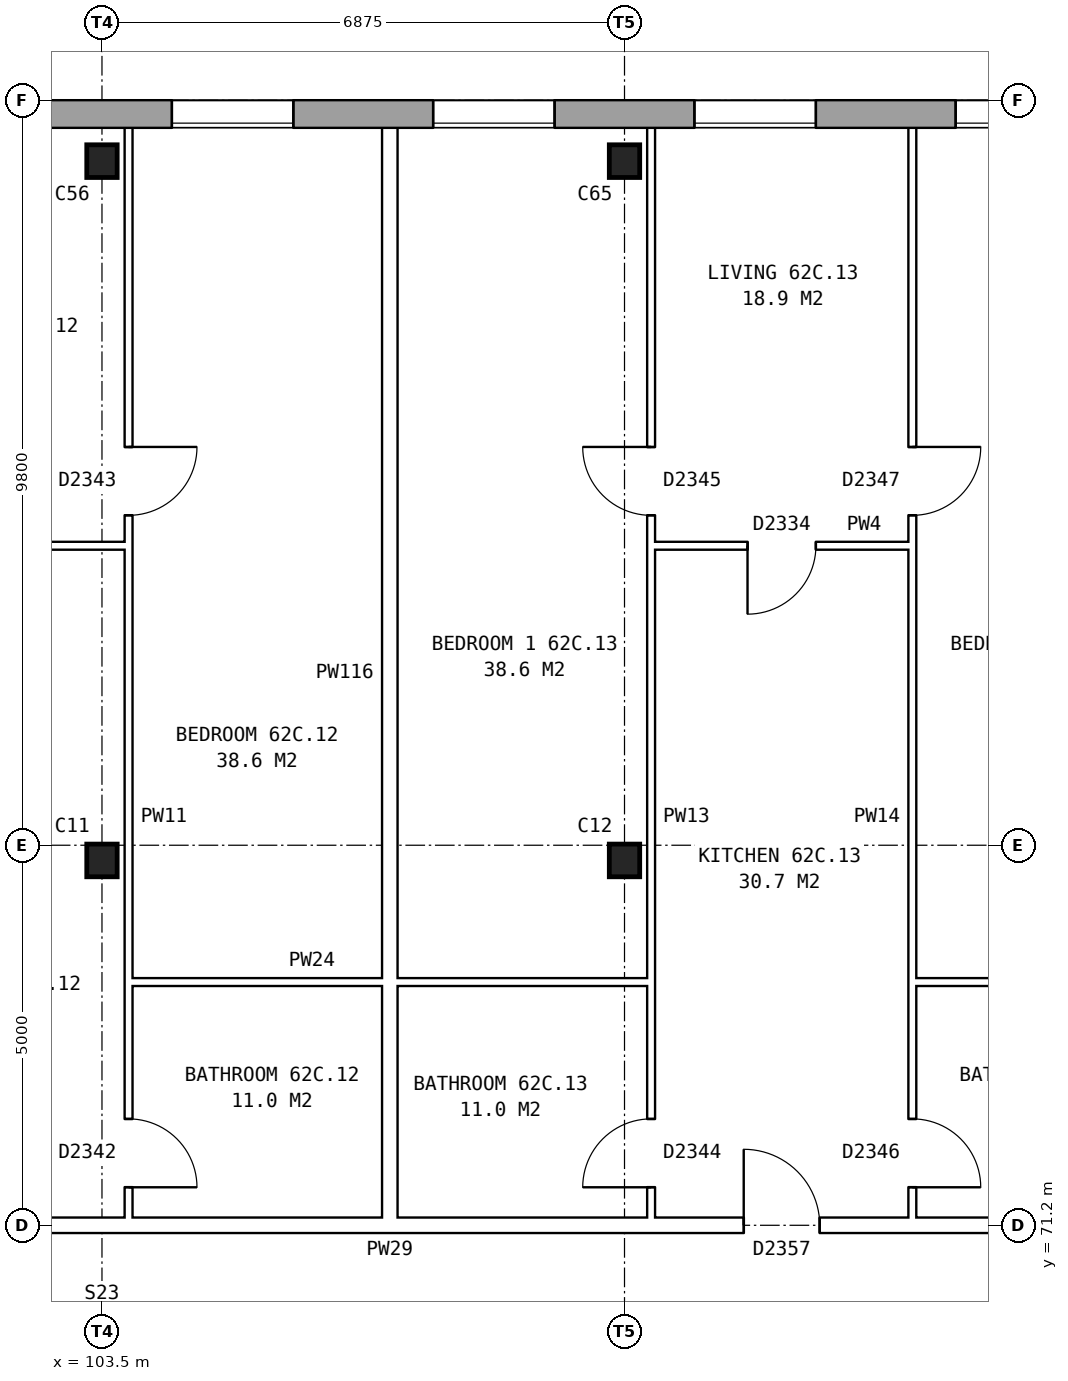
"""IFC4 building model, lengths in metres.
Left out: names, types, materials, properties, quantities, classifications, styles, units other than length and angle.
Written with IfcOpenShell. Run it as: python <this file> out.ifc"""

import sys

from ifc_helpers import new_model, si_unit, direction, frame, frame_2d, origin, origin_2d, place, context, subcontext, project, spatial, rectangle, i_section, extrude, element, fill, save


model = new_model("IFC4")
c1 = context("Model", 3, precision=1e-05, world=origin(), true_north=direction((0.0, 1.0)))
c2 = subcontext(c1, "Body", "Model", "MODEL_VIEW")
j1 = project(units=[si_unit("LENGTHUNIT", "METRE"), si_unit("PLANEANGLEUNIT", "RADIAN")], contexts=[c1])
p1 = place(None, origin())
s1 = spatial("IfcSite", under=j1, at=p1, CompositionType="ELEMENT")
p2 = place(p1, origin())
s2 = spatial("IfcBuilding", under=s1, at=p2, CompositionType="ELEMENT")
p3 = place(p2, frame((0.0, 0.0, 221.4)))
s3 = spatial("IfcBuildingStorey", under=s2, at=p3, CompositionType="ELEMENT", Elevation=221.4)
for number, where, z_axis, x_axis in (
    (1, (103.5, 76.0, 0.0), (0.0, 0.0, 1.0), (1.0, 0.0, 0.0)),
    (2, (110.375, 76.0, 0.0), (0.0, 0.0, 1.0), (1.0, 0.0, 0.0)),
    (3, (103.5, 85.2, 0.0), (0.0, 0.0, 1.0), (1.0, 0.0, 0.0)),
    (4, (110.375, 85.2, 0.0), (0.0, 0.0, 1.0), (1.0, 0.0, 0.0)),
):
    element("IfcColumn", number, at=place(p3, frame(where, z_axis=z_axis, x_axis=x_axis)), inside=s3, PredefinedType="COLUMN", context=c2, shape_type="SweptSolid", body=[
        extrude(i_section(OverallWidth=0.4, OverallDepth=0.43, WebThickness=0.04, FlangeThickness=0.04, at=origin_2d()), origin(), (0.0, 0.0, 1.0), 2.85),
    ])
p4 = place(p3, frame((131.05, 85.82, 0.0), z_axis=(0.0, 0.0, 1.0), x_axis=(-1.0, 0.0, 0.0)))
e5 = element("IfcWall", 5, at=p4, inside=s3, PredefinedType="STANDARD", context=c2, shape_type="SweptSolid", body=[
    extrude(rectangle(XDim=55.1, YDim=0.36, at=frame_2d((27.55, 0.0))), origin(), (0.0, 0.0, 1.0), 2.85),
])
p5 = place(p4, frame((0.969, 0.0, 0.8)))
e6 = element("IfcOpeningElement", 6, at=p5, cuts=e5, PredefinedType="OPENING", context=c2, shape_type="SweptSolid", body=[
    extrude(rectangle(XDim=1.6, YDim=1.8, at=frame_2d((0.8, 0.9))), frame((0.0, 0.19, 0.0), z_axis=(0.0, -1.0, 0.0), x_axis=(1.0, 0.0, 0.0)), (0.0, 0.0, 1.0), 0.38),
])
p6 = place(p4, frame((4.406, 0.0, 0.8)))
e7 = element("IfcOpeningElement", 7, at=p6, cuts=e5, PredefinedType="OPENING", context=c2, shape_type="SweptSolid", body=[
    extrude(rectangle(XDim=1.6, YDim=1.8, at=frame_2d((0.8, 0.9))), frame((0.0, 0.19, 0.0), z_axis=(0.0, -1.0, 0.0), x_axis=(1.0, 0.0, 0.0)), (0.0, 0.0, 1.0), 0.38),
])
p7 = place(p4, frame((7.844, 0.0, 0.8)))
e8 = element("IfcOpeningElement", 8, at=p7, cuts=e5, PredefinedType="OPENING", context=c2, shape_type="SweptSolid", body=[
    extrude(rectangle(XDim=1.6, YDim=1.8, at=frame_2d((0.8, 0.9))), frame((0.0, 0.19, 0.0), z_axis=(0.0, -1.0, 0.0), x_axis=(1.0, 0.0, 0.0)), (0.0, 0.0, 1.0), 0.38),
])
p8 = place(p4, frame((11.281, 0.0, 0.8)))
e9 = element("IfcOpeningElement", 9, at=p8, cuts=e5, PredefinedType="OPENING", context=c2, shape_type="SweptSolid", body=[
    extrude(rectangle(XDim=1.6, YDim=1.8, at=frame_2d((0.8, 0.9))), frame((0.0, 0.19, 0.0), z_axis=(0.0, -1.0, 0.0), x_axis=(1.0, 0.0, 0.0)), (0.0, 0.0, 1.0), 0.38),
])
p9 = place(p4, frame((14.719, 0.0, 0.8)))
e10 = element("IfcOpeningElement", 10, at=p9, cuts=e5, PredefinedType="OPENING", context=c2, shape_type="SweptSolid", body=[
    extrude(rectangle(XDim=1.6, YDim=1.8, at=frame_2d((0.8, 0.9))), frame((0.0, 0.19, 0.0), z_axis=(0.0, -1.0, 0.0), x_axis=(1.0, 0.0, 0.0)), (0.0, 0.0, 1.0), 0.38),
])
p10 = place(p4, frame((18.156, 0.0, 0.8)))
e11 = element("IfcOpeningElement", 11, at=p10, cuts=e5, PredefinedType="OPENING", context=c2, shape_type="SweptSolid", body=[
    extrude(rectangle(XDim=1.6, YDim=1.8, at=frame_2d((0.8, 0.9))), frame((0.0, 0.19, 0.0), z_axis=(0.0, -1.0, 0.0), x_axis=(1.0, 0.0, 0.0)), (0.0, 0.0, 1.0), 0.38),
])
p11 = place(p4, frame((21.594, 0.0, 0.8)))
e12 = element("IfcOpeningElement", 12, at=p11, cuts=e5, PredefinedType="OPENING", context=c2, shape_type="SweptSolid", body=[
    extrude(rectangle(XDim=1.6, YDim=1.8, at=frame_2d((0.8, 0.9))), frame((0.0, 0.19, 0.0), z_axis=(0.0, -1.0, 0.0), x_axis=(1.0, 0.0, 0.0)), (0.0, 0.0, 1.0), 0.38),
])
p12 = place(p4, frame((25.031, 0.0, 0.8)))
e13 = element("IfcOpeningElement", 13, at=p12, cuts=e5, PredefinedType="OPENING", context=c2, shape_type="SweptSolid", body=[
    extrude(rectangle(XDim=1.6, YDim=1.8, at=frame_2d((0.8, 0.9))), frame((0.0, 0.19, 0.0), z_axis=(0.0, -1.0, 0.0), x_axis=(1.0, 0.0, 0.0)), (0.0, 0.0, 1.0), 0.38),
])
p13 = place(p4, frame((28.469, 0.0, 0.8)))
e14 = element("IfcOpeningElement", 14, at=p13, cuts=e5, PredefinedType="OPENING", context=c2, shape_type="SweptSolid", body=[
    extrude(rectangle(XDim=1.6, YDim=1.8, at=frame_2d((0.8, 0.9))), frame((0.0, 0.19, 0.0), z_axis=(0.0, -1.0, 0.0), x_axis=(1.0, 0.0, 0.0)), (0.0, 0.0, 1.0), 0.38),
])
p14 = place(p4, frame((31.906, 0.0, 0.8)))
e15 = element("IfcOpeningElement", 15, at=p14, cuts=e5, PredefinedType="OPENING", context=c2, shape_type="SweptSolid", body=[
    extrude(rectangle(XDim=1.6, YDim=1.8, at=frame_2d((0.8, 0.9))), frame((0.0, 0.19, 0.0), z_axis=(0.0, -1.0, 0.0), x_axis=(1.0, 0.0, 0.0)), (0.0, 0.0, 1.0), 0.38),
])
p15 = place(p4, frame((35.344, 0.0, 0.8)))
e16 = element("IfcOpeningElement", 16, at=p15, cuts=e5, PredefinedType="OPENING", context=c2, shape_type="SweptSolid", body=[
    extrude(rectangle(XDim=1.6, YDim=1.8, at=frame_2d((0.8, 0.9))), frame((0.0, 0.19, 0.0), z_axis=(0.0, -1.0, 0.0), x_axis=(1.0, 0.0, 0.0)), (0.0, 0.0, 1.0), 0.38),
])
p16 = place(p4, frame((38.781, 0.0, 0.8)))
e17 = element("IfcOpeningElement", 17, at=p16, cuts=e5, PredefinedType="OPENING", context=c2, shape_type="SweptSolid", body=[
    extrude(rectangle(XDim=1.6, YDim=1.8, at=frame_2d((0.8, 0.9))), frame((0.0, 0.19, 0.0), z_axis=(0.0, -1.0, 0.0), x_axis=(1.0, 0.0, 0.0)), (0.0, 0.0, 1.0), 0.38),
])
p17 = place(p4, frame((42.219, 0.0, 0.8)))
e18 = element("IfcOpeningElement", 18, at=p17, cuts=e5, PredefinedType="OPENING", context=c2, shape_type="SweptSolid", body=[
    extrude(rectangle(XDim=1.6, YDim=1.8, at=frame_2d((0.8, 0.9))), frame((0.0, 0.19, 0.0), z_axis=(0.0, -1.0, 0.0), x_axis=(1.0, 0.0, 0.0)), (0.0, 0.0, 1.0), 0.38),
])
p18 = place(p4, frame((45.656, 0.0, 0.8)))
e19 = element("IfcOpeningElement", 19, at=p18, cuts=e5, PredefinedType="OPENING", context=c2, shape_type="SweptSolid", body=[
    extrude(rectangle(XDim=1.6, YDim=1.8, at=frame_2d((0.8, 0.9))), frame((0.0, 0.19, 0.0), z_axis=(0.0, -1.0, 0.0), x_axis=(1.0, 0.0, 0.0)), (0.0, 0.0, 1.0), 0.38),
])
p19 = place(p4, frame((49.094, 0.0, 0.8)))
e20 = element("IfcOpeningElement", 20, at=p19, cuts=e5, PredefinedType="OPENING", context=c2, shape_type="SweptSolid", body=[
    extrude(rectangle(XDim=1.6, YDim=1.8, at=frame_2d((0.8, 0.9))), frame((0.0, 0.19, 0.0), z_axis=(0.0, -1.0, 0.0), x_axis=(1.0, 0.0, 0.0)), (0.0, 0.0, 1.0), 0.38),
])
p20 = place(p4, frame((52.531, 0.0, 0.8)))
e21 = element("IfcOpeningElement", 21, at=p20, cuts=e5, PredefinedType="OPENING", context=c2, shape_type="SweptSolid", body=[
    extrude(rectangle(XDim=1.6, YDim=1.8, at=frame_2d((0.8, 0.9))), frame((0.0, 0.19, 0.0), z_axis=(0.0, -1.0, 0.0), x_axis=(1.0, 0.0, 0.0)), (0.0, 0.0, 1.0), 0.38),
])
p21 = place(p3, frame((83.225, 71.2, 0.0), z_axis=(0.0, 0.0, 1.0), x_axis=(1.0, 0.0, 0.0)))
e22 = element("IfcWall", 22, at=p21, inside=s3, PredefinedType="PARTITIONING", context=c2, shape_type="SweptSolid", body=[
    extrude(rectangle(XDim=41.25, YDim=0.2, at=frame_2d((20.625, 0.0))), origin(), (0.0, 0.0, 1.0), 2.85),
])
p22 = place(p21, frame((4.656, 0.0, 0.0)))
e23 = element("IfcOpeningElement", 23, at=p22, cuts=e22, PredefinedType="OPENING", context=c2, shape_type="SweptSolid", body=[
    extrude(rectangle(XDim=1.0, YDim=2.1, at=frame_2d((0.5, 1.05))), frame((0.0, 0.11, 0.0), z_axis=(0.0, -1.0, 0.0), x_axis=(1.0, 0.0, 0.0)), (0.0, 0.0, 1.0), 0.22),
])
p23 = place(p21, frame((11.531, 0.0, 0.0)))
e24 = element("IfcOpeningElement", 24, at=p23, cuts=e22, PredefinedType="OPENING", context=c2, shape_type="SweptSolid", body=[
    extrude(rectangle(XDim=1.0, YDim=2.1, at=frame_2d((0.5, 1.05))), frame((0.0, 0.11, 0.0), z_axis=(0.0, -1.0, 0.0), x_axis=(1.0, 0.0, 0.0)), (0.0, 0.0, 1.0), 0.22),
])
p24 = place(p21, frame((18.406, 0.0, 0.0)))
e25 = element("IfcOpeningElement", 25, at=p24, cuts=e22, PredefinedType="OPENING", context=c2, shape_type="SweptSolid", body=[
    extrude(rectangle(XDim=1.0, YDim=2.1, at=frame_2d((0.5, 1.05))), frame((0.0, 0.11, 0.0), z_axis=(0.0, -1.0, 0.0), x_axis=(1.0, 0.0, 0.0)), (0.0, 0.0, 1.0), 0.22),
])
p25 = place(p21, frame((28.719, 0.0, 0.0)))
e26 = element("IfcOpeningElement", 26, at=p25, cuts=e22, PredefinedType="OPENING", context=c2, shape_type="SweptSolid", body=[
    extrude(rectangle(XDim=1.0, YDim=2.1, at=frame_2d((0.5, 1.05))), frame((0.0, 0.11, 0.0), z_axis=(0.0, -1.0, 0.0), x_axis=(1.0, 0.0, 0.0)), (0.0, 0.0, 1.0), 0.22),
])
p26 = place(p21, frame((35.594, 0.0, 0.0)))
e27 = element("IfcOpeningElement", 27, at=p26, cuts=e22, PredefinedType="OPENING", context=c2, shape_type="SweptSolid", body=[
    extrude(rectangle(XDim=1.0, YDim=2.1, at=frame_2d((0.5, 1.05))), frame((0.0, 0.11, 0.0), z_axis=(0.0, -1.0, 0.0), x_axis=(1.0, 0.0, 0.0)), (0.0, 0.0, 1.0), 0.22),
])
p27 = place(p3, frame((103.85, 74.4, 0.0), z_axis=(0.0, 0.0, 1.0), x_axis=(1.0, 0.0, 0.0)))
e28 = element("IfcWall", 28, at=p27, inside=s3, PredefinedType="PARTITIONING", context=c2, shape_type="SweptSolid", body=[
    extrude(rectangle(XDim=6.875, YDim=0.1, at=frame_2d((3.438, 0.0))), origin(), (0.0, 0.0, 1.0), 2.85),
])
p28 = place(p3, frame((114.162, 74.4, 0.0), z_axis=(0.0, 0.0, 1.0), x_axis=(1.0, 0.0, 0.0)))
e29 = element("IfcWall", 29, at=p28, inside=s3, PredefinedType="PARTITIONING", context=c2, shape_type="SweptSolid", body=[
    extrude(rectangle(XDim=3.338, YDim=0.1, at=frame_2d((1.669, 0.0))), origin(), (0.0, 0.0, 1.0), 2.85),
])
p29 = place(p3, frame((100.512, 80.14, 0.0), z_axis=(0.0, 0.0, 1.0), x_axis=(1.0, 0.0, 0.0)))
e30 = element("IfcWall", 30, at=p29, inside=s3, PredefinedType="PARTITIONING", context=c2, shape_type="SweptSolid", body=[
    extrude(rectangle(XDim=3.338, YDim=0.1, at=frame_2d((1.669, 0.0))), origin(), (0.0, 0.0, 1.0), 2.85),
])
p30 = place(p29, frame((1.219, 0.0, 0.0)))
e31 = element("IfcOpeningElement", 31, at=p30, cuts=e30, PredefinedType="OPENING", context=c2, shape_type="SweptSolid", body=[
    extrude(rectangle(XDim=0.9, YDim=2.1, at=frame_2d((0.45, 1.05))), frame((0.0, 0.06, 0.0), z_axis=(0.0, -1.0, 0.0), x_axis=(1.0, 0.0, 0.0)), (0.0, 0.0, 1.0), 0.12),
])
p31 = place(p3, frame((110.725, 80.14, 0.0), z_axis=(0.0, 0.0, 1.0), x_axis=(1.0, 0.0, 0.0)))
e32 = element("IfcWall", 32, at=p31, inside=s3, PredefinedType="PARTITIONING", context=c2, shape_type="SweptSolid", body=[
    extrude(rectangle(XDim=3.437, YDim=0.1, at=frame_2d((1.719, 0.0))), origin(), (0.0, 0.0, 1.0), 2.85),
])
p32 = place(p31, frame((1.269, 0.0, 0.0)))
e33 = element("IfcOpeningElement", 33, at=p32, cuts=e32, PredefinedType="OPENING", context=c2, shape_type="SweptSolid", body=[
    extrude(rectangle(XDim=0.9, YDim=2.1, at=frame_2d((0.45, 1.05))), frame((0.0, 0.06, 0.0), z_axis=(0.0, -1.0, 0.0), x_axis=(1.0, 0.0, 0.0)), (0.0, 0.0, 1.0), 0.12),
])
p33 = place(p3, frame((103.85, 71.3, 0.0), z_axis=(0.0, 0.0, 1.0), x_axis=(0.0, 1.0, 0.0)))
e34 = element("IfcWall", 34, at=p33, inside=s3, PredefinedType="PARTITIONING", context=c2, shape_type="SweptSolid", body=[
    extrude(rectangle(XDim=14.34, YDim=0.1, at=frame_2d((7.17, 0.0))), origin(), (0.0, 0.0, 1.0), 2.85),
])
p34 = place(p33, frame((9.24, 0.0, 0.0)))
e35 = element("IfcOpeningElement", 35, at=p34, cuts=e34, PredefinedType="OPENING", context=c2, shape_type="SweptSolid", body=[
    extrude(rectangle(XDim=0.9, YDim=2.1, at=frame_2d((0.45, 1.05))), frame((0.0, 0.06, 0.0), z_axis=(0.0, -1.0, 0.0), x_axis=(1.0, 0.0, 0.0)), (0.0, 0.0, 1.0), 0.12),
])
p35 = place(p33, frame((0.4, 0.0, 0.0)))
e36 = element("IfcOpeningElement", 36, at=p35, cuts=e34, PredefinedType="OPENING", context=c2, shape_type="SweptSolid", body=[
    extrude(rectangle(XDim=0.9, YDim=2.1, at=frame_2d((0.45, 1.05))), frame((0.0, 0.06, 0.0), z_axis=(0.0, -1.0, 0.0), x_axis=(1.0, 0.0, 0.0)), (0.0, 0.0, 1.0), 0.12),
])
p36 = place(p3, frame((107.287, 71.3, 0.0), z_axis=(0.0, 0.0, 1.0), x_axis=(0.0, 1.0, 0.0)))
e37 = element("IfcWall", 37, at=p36, inside=s3, PredefinedType="PARTITIONING", context=c2, shape_type="SweptSolid", body=[
    extrude(rectangle(XDim=14.34, YDim=0.2, at=frame_2d((7.17, 0.0))), origin(), (0.0, 0.0, 1.0), 2.85),
])
p37 = place(p3, frame((110.725, 71.3, 0.0), z_axis=(0.0, 0.0, 1.0), x_axis=(0.0, 1.0, 0.0)))
e38 = element("IfcWall", 38, at=p37, inside=s3, PredefinedType="PARTITIONING", context=c2, shape_type="SweptSolid", body=[
    extrude(rectangle(XDim=14.34, YDim=0.1, at=frame_2d((7.17, 0.0))), origin(), (0.0, 0.0, 1.0), 2.85),
])
p38 = place(p37, frame((9.24, 0.0, 0.0)))
e39 = element("IfcOpeningElement", 39, at=p38, cuts=e38, PredefinedType="OPENING", context=c2, shape_type="SweptSolid", body=[
    extrude(rectangle(XDim=0.9, YDim=2.1, at=frame_2d((0.45, 1.05))), frame((0.0, 0.06, 0.0), z_axis=(0.0, -1.0, 0.0), x_axis=(1.0, 0.0, 0.0)), (0.0, 0.0, 1.0), 0.12),
])
p39 = place(p37, frame((0.4, 0.0, 0.0)))
e40 = element("IfcOpeningElement", 40, at=p39, cuts=e38, PredefinedType="OPENING", context=c2, shape_type="SweptSolid", body=[
    extrude(rectangle(XDim=0.9, YDim=2.1, at=frame_2d((0.45, 1.05))), frame((0.0, 0.06, 0.0), z_axis=(0.0, -1.0, 0.0), x_axis=(1.0, 0.0, 0.0)), (0.0, 0.0, 1.0), 0.12),
])
p40 = place(p3, frame((114.162, 71.3, 0.0), z_axis=(0.0, 0.0, 1.0), x_axis=(0.0, 1.0, 0.0)))
e41 = element("IfcWall", 41, at=p40, inside=s3, PredefinedType="PARTITIONING", context=c2, shape_type="SweptSolid", body=[
    extrude(rectangle(XDim=14.34, YDim=0.1, at=frame_2d((7.17, 0.0))), origin(), (0.0, 0.0, 1.0), 2.85),
])
p41 = place(p40, frame((9.24, 0.0, 0.0)))
e42 = element("IfcOpeningElement", 42, at=p41, cuts=e41, PredefinedType="OPENING", context=c2, shape_type="SweptSolid", body=[
    extrude(rectangle(XDim=0.9, YDim=2.1, at=frame_2d((0.45, 1.05))), frame((0.0, 0.06, 0.0), z_axis=(0.0, -1.0, 0.0), x_axis=(1.0, 0.0, 0.0)), (0.0, 0.0, 1.0), 0.12),
])
p42 = place(p40, frame((0.4, 0.0, 0.0)))
e43 = element("IfcOpeningElement", 43, at=p42, cuts=e41, PredefinedType="OPENING", context=c2, shape_type="SweptSolid", body=[
    extrude(rectangle(XDim=0.9, YDim=2.1, at=frame_2d((0.45, 1.05))), frame((0.0, 0.06, 0.0), z_axis=(0.0, -1.0, 0.0), x_axis=(1.0, 0.0, 0.0)), (0.0, 0.0, 1.0), 0.12),
])
p43 = place(p9, origin())
e44 = element("IfcWindow", 44, at=p43, inside=s3, PartitioningType="SINGLE_PANEL", PredefinedType="WINDOW", context=c2, shape_type="SweptSolid", body=[
    extrude(rectangle(XDim=1.6, YDim=1.8, at=frame_2d((0.8, 0.9))), frame((0.0, 0.15, 0.0), z_axis=(0.0, -1.0, 0.0), x_axis=(1.0, 0.0, 0.0)), (0.0, 0.0, 1.0), 0.06),
])
fill(e10, e44)
p44 = place(p10, origin())
e45 = element("IfcWindow", 45, at=p44, inside=s3, PartitioningType="SINGLE_PANEL", PredefinedType="WINDOW", context=c2, shape_type="SweptSolid", body=[
    extrude(rectangle(XDim=1.6, YDim=1.8, at=frame_2d((0.8, 0.9))), frame((0.0, 0.15, 0.0), z_axis=(0.0, -1.0, 0.0), x_axis=(1.0, 0.0, 0.0)), (0.0, 0.0, 1.0), 0.06),
])
fill(e11, e45)
p45 = place(p11, origin())
e46 = element("IfcWindow", 46, at=p45, inside=s3, PartitioningType="SINGLE_PANEL", PredefinedType="WINDOW", context=c2, shape_type="SweptSolid", body=[
    extrude(rectangle(XDim=1.6, YDim=1.8, at=frame_2d((0.8, 0.9))), frame((0.0, 0.15, 0.0), z_axis=(0.0, -1.0, 0.0), x_axis=(1.0, 0.0, 0.0)), (0.0, 0.0, 1.0), 0.06),
])
fill(e12, e46)
p46 = place(p12, origin())
e47 = element("IfcWindow", 47, at=p46, inside=s3, PartitioningType="SINGLE_PANEL", PredefinedType="WINDOW", context=c2, shape_type="SweptSolid", body=[
    extrude(rectangle(XDim=1.6, YDim=1.8, at=frame_2d((0.8, 0.9))), frame((0.0, 0.15, 0.0), z_axis=(0.0, -1.0, 0.0), x_axis=(1.0, 0.0, 0.0)), (0.0, 0.0, 1.0), 0.06),
])
fill(e13, e47)
p47 = place(p34, frame((0.9, 0.0, 0.0), z_axis=(0.0, 0.0, 1.0), x_axis=(-1.0, 0.0, 0.0)))
e48 = element("IfcDoor", 48, at=p47, inside=s3, OperationType="SINGLE_SWING_LEFT", PredefinedType="DOOR", context=c2, shape_type="SweptSolid", body=[
    extrude(rectangle(XDim=0.9, YDim=2.1, at=frame_2d((0.45, 1.05))), frame((0.0, 0.025, 0.0), z_axis=(0.0, -1.0, 0.0), x_axis=(1.0, 0.0, 0.0)), (0.0, 0.0, 1.0), 0.05),
])
fill(e35, e48)
p48 = place(p35, frame((0.9, 0.0, 0.0), z_axis=(0.0, 0.0, 1.0), x_axis=(-1.0, 0.0, 0.0)))
e49 = element("IfcDoor", 49, at=p48, inside=s3, OperationType="SINGLE_SWING_RIGHT", PredefinedType="DOOR", context=c2, shape_type="SweptSolid", body=[
    extrude(rectangle(XDim=0.9, YDim=2.1, at=frame_2d((0.45, 1.05))), frame((0.0, 0.025, 0.0), z_axis=(0.0, -1.0, 0.0), x_axis=(1.0, 0.0, 0.0)), (0.0, 0.0, 1.0), 0.05),
])
fill(e36, e49)
p49 = place(p38, origin())
e50 = element("IfcDoor", 50, at=p49, inside=s3, OperationType="SINGLE_SWING_RIGHT", PredefinedType="DOOR", context=c2, shape_type="SweptSolid", body=[
    extrude(rectangle(XDim=0.9, YDim=2.1, at=frame_2d((0.45, 1.05))), frame((0.0, 0.025, 0.0), z_axis=(0.0, -1.0, 0.0), x_axis=(1.0, 0.0, 0.0)), (0.0, 0.0, 1.0), 0.05),
])
fill(e39, e50)
p50 = place(p41, frame((0.9, 0.0, 0.0), z_axis=(0.0, 0.0, 1.0), x_axis=(-1.0, 0.0, 0.0)))
e51 = element("IfcDoor", 51, at=p50, inside=s3, OperationType="SINGLE_SWING_LEFT", PredefinedType="DOOR", context=c2, shape_type="SweptSolid", body=[
    extrude(rectangle(XDim=0.9, YDim=2.1, at=frame_2d((0.45, 1.05))), frame((0.0, 0.025, 0.0), z_axis=(0.0, -1.0, 0.0), x_axis=(1.0, 0.0, 0.0)), (0.0, 0.0, 1.0), 0.05),
])
fill(e42, e51)
p51 = place(p25, origin())
e52 = element("IfcDoor", 52, at=p51, inside=s3, OperationType="SINGLE_SWING_LEFT", PredefinedType="DOOR", context=c2, shape_type="SweptSolid", body=[
    extrude(rectangle(XDim=1.0, YDim=2.1, at=frame_2d((0.5, 1.05))), frame((0.0, 0.025, 0.0), z_axis=(0.0, -1.0, 0.0), x_axis=(1.0, 0.0, 0.0)), (0.0, 0.0, 1.0), 0.05),
])
fill(e26, e52)
p52 = place(p32, frame((0.9, 0.0, 0.0), z_axis=(0.0, 0.0, 1.0), x_axis=(-1.0, 0.0, 0.0)))
e53 = element("IfcDoor", 53, at=p52, inside=s3, OperationType="SINGLE_SWING_RIGHT", PredefinedType="DOOR", context=c2, shape_type="SweptSolid", body=[
    extrude(rectangle(XDim=0.9, YDim=2.1, at=frame_2d((0.45, 1.05))), frame((0.0, 0.025, 0.0), z_axis=(0.0, -1.0, 0.0), x_axis=(1.0, 0.0, 0.0)), (0.0, 0.0, 1.0), 0.05),
])
fill(e33, e53)
p53 = place(p39, origin())
e54 = element("IfcDoor", 54, at=p53, inside=s3, OperationType="SINGLE_SWING_LEFT", PredefinedType="DOOR", context=c2, shape_type="SweptSolid", body=[
    extrude(rectangle(XDim=0.9, YDim=2.1, at=frame_2d((0.45, 1.05))), frame((0.0, 0.025, 0.0), z_axis=(0.0, -1.0, 0.0), x_axis=(1.0, 0.0, 0.0)), (0.0, 0.0, 1.0), 0.05),
])
fill(e40, e54)
p54 = place(p42, frame((0.9, 0.0, 0.0), z_axis=(0.0, 0.0, 1.0), x_axis=(-1.0, 0.0, 0.0)))
e55 = element("IfcDoor", 55, at=p54, inside=s3, OperationType="SINGLE_SWING_RIGHT", PredefinedType="DOOR", context=c2, shape_type="SweptSolid", body=[
    extrude(rectangle(XDim=0.9, YDim=2.1, at=frame_2d((0.45, 1.05))), frame((0.0, 0.025, 0.0), z_axis=(0.0, -1.0, 0.0), x_axis=(1.0, 0.0, 0.0)), (0.0, 0.0, 1.0), 0.05),
])
fill(e43, e55)
save(model, sys.argv[1])
